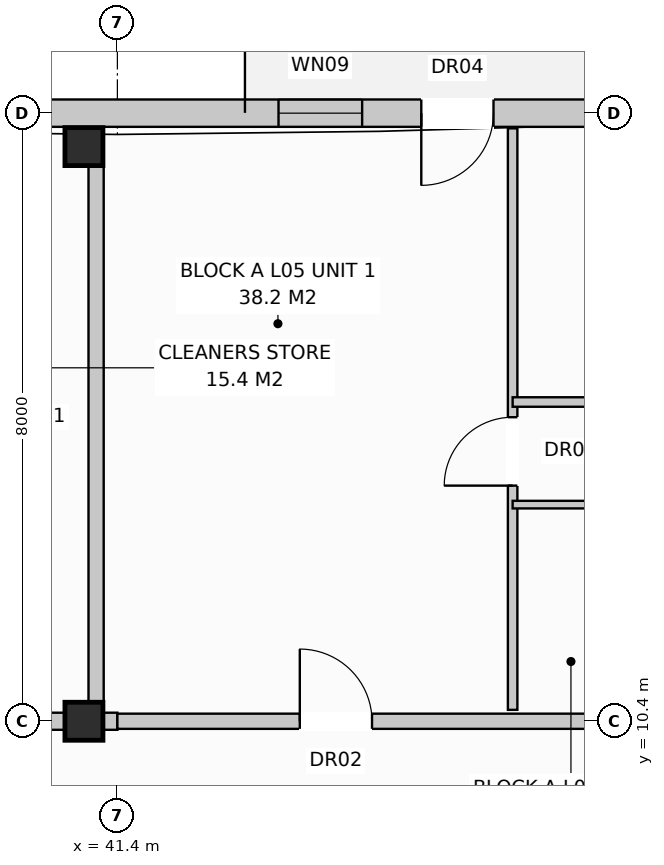
"""IFC4 building model, lengths in metres.
Left out: names, types, materials, properties, quantities, classifications, styles, units other than length and angle.
Written with IfcOpenShell. Run it as: python <this file> out.ifc"""

import sys

from ifc_helpers import new_model, si_unit, direction, frame, frame_2d, origin, origin_with_axes, origin_2d, place, context, subcontext, project, spatial, rectangle, extrude, element, fill, save


model = new_model("IFC4")
c1 = context("Model", 3, precision=1e-05, world=origin(), true_north=direction((0.0, 1.0)))
c2 = subcontext(c1, "Body", "Model", "MODEL_VIEW")
j1 = project(units=[si_unit("LENGTHUNIT", "METRE"), si_unit("PLANEANGLEUNIT", "RADIAN")], contexts=[c1])
p1 = place(None, origin())
s1 = spatial("IfcSite", under=j1, at=p1, CompositionType="ELEMENT")
p2 = place(p1, origin())
s2 = spatial("IfcBuilding", under=s1, at=p2, CompositionType="ELEMENT")
p3 = place(p2, frame((0.0, 0.0, 17.6)))
s3 = spatial("IfcBuildingStorey", under=s2, at=p3, CompositionType="ELEMENT", Elevation=17.6)
for number, where, z_axis, x_axis in (
    (1, (40.96, 10.4, 0.0), (0.0, 0.0, 1.0), (1.0, 0.0, 0.0)),
    (2, (40.96, 17.96, 0.0), (0.0, 0.0, 1.0), (1.0, 0.0, 0.0)),
):
    element("IfcColumn", number, at=place(p3, frame(where, z_axis=z_axis, x_axis=x_axis)), inside=s3, PredefinedType="COLUMN", context=c2, shape_type="SweptSolid", body=[
        extrude(rectangle(XDim=0.5, YDim=0.5, at=origin_2d()), origin(), (0.0, 0.0, 1.0), 3.2),
    ])
p4 = place(p3, frame((31.35, 18.4, 0.0), z_axis=(0.0, 0.0, 1.0), x_axis=(1.0, 0.0, 0.0)))
e3 = element("IfcWall", 3, at=p4, inside=s3, PredefinedType="STANDARD", context=c2, shape_type="SweptSolid", body=[
    extrude(rectangle(XDim=23.68, YDim=0.36, at=frame_2d((11.84, 0.0))), origin(), (0.0, 0.0, 1.0), 2.95),
])
p5 = place(p4, frame((14.048, 0.0, 0.0)))
e4 = element("IfcOpeningElement", 4, at=p5, cuts=e3, PredefinedType="OPENING", context=c2, shape_type="SweptSolid", body=[
    extrude(rectangle(XDim=0.95, YDim=2.1, at=frame_2d((0.475, 1.05))), frame((0.0, 0.192, 0.0), z_axis=(0.0, -1.0, 0.0), x_axis=(1.0, 0.0, 0.0)), (0.0, 0.0, 1.0), 0.384),
])
p6 = place(p4, frame((12.17, 0.0, 0.72)))
e5 = element("IfcOpeningElement", 5, at=p6, cuts=e3, PredefinedType="OPENING", context=c2, shape_type="SweptSolid", body=[
    extrude(rectangle(XDim=1.1, YDim=1.5, at=frame_2d((0.55, 0.75))), frame((0.0, 0.192, 0.0), z_axis=(0.0, -1.0, 0.0), x_axis=(1.0, 0.0, 0.0)), (0.0, 0.0, 1.0), 0.384),
])
p7 = place(p4, frame((17.403, 0.0, 0.8)))
e6 = element("IfcOpeningElement", 6, at=p7, cuts=e3, PredefinedType="OPENING", context=c2, shape_type="SweptSolid", body=[
    extrude(rectangle(XDim=1.95, YDim=1.65, at=frame_2d((0.975, 0.825))), frame((0.0, 0.192, 0.0), z_axis=(0.0, -1.0, 0.0), x_axis=(1.0, 0.0, 0.0)), (0.0, 0.0, 1.0), 0.384),
])
p8 = place(p4, frame((21.07, 0.0, 0.72)))
e7 = element("IfcOpeningElement", 7, at=p8, cuts=e3, PredefinedType="OPENING", context=c2, shape_type="SweptSolid", body=[
    extrude(rectangle(XDim=1.1, YDim=1.5, at=frame_2d((0.55, 0.75))), frame((0.0, 0.192, 0.0), z_axis=(0.0, -1.0, 0.0), x_axis=(1.0, 0.0, 0.0)), (0.0, 0.0, 1.0), 0.384),
])
p9 = place(p3, frame((41.12, 10.6, 0.0), z_axis=(0.0, 0.0, 1.0), x_axis=(0.0, 1.0, 0.0)))
e8 = element("IfcWall", 8, at=p9, inside=s3, PredefinedType="PARTITIONING", context=c2, shape_type="SweptSolid", body=[
    extrude(rectangle(XDim=7.6, YDim=0.2, at=frame_2d((3.8, 0.0))), origin(), (0.0, 0.0, 1.0), 2.95),
])
p10 = place(p3, frame((31.5, 10.4, 0.0), z_axis=(0.0, 0.0, 1.0), x_axis=(1.0, 0.0, 0.0)))
e9 = element("IfcWall", 9, at=p10, inside=s3, PredefinedType="PARTITIONING", context=c2, shape_type="SweptSolid", body=[
    extrude(rectangle(XDim=9.9, YDim=0.225, at=frame_2d((4.95, 0.0))), origin(), (0.0, 0.0, 1.0), 2.39),
])
p11 = place(p10, frame((0.475, 0.0, 0.0)))
e10 = element("IfcOpeningElement", 10, at=p11, cuts=e9, PredefinedType="OPENING", context=c2, shape_type="SweptSolid", body=[
    extrude(rectangle(XDim=1.1, YDim=2.15, at=frame_2d((0.55, 1.075))), frame((0.0, 0.125, 0.0), z_axis=(0.0, -1.0, 0.0), x_axis=(1.0, 0.0, 0.0)), (0.0, 0.0, 1.0), 0.249),
])
p12 = place(p10, frame((5.75, 0.0, 0.0)))
e11 = element("IfcOpeningElement", 11, at=p12, cuts=e9, PredefinedType="OPENING", context=c2, shape_type="SweptSolid", body=[
    extrude(rectangle(XDim=0.9, YDim=2.1, at=frame_2d((0.45, 1.05))), frame((0.0, 0.125, 0.0), z_axis=(0.0, -1.0, 0.0), x_axis=(1.0, 0.0, 0.0)), (0.0, 0.0, 1.0), 0.249),
])
p13 = place(p10, frame((7.8, 0.0, 0.0)))
e12 = element("IfcOpeningElement", 12, at=p13, cuts=e9, PredefinedType="OPENING", context=c2, shape_type="SweptSolid", body=[
    extrude(rectangle(XDim=0.95, YDim=2.15, at=frame_2d((0.475, 1.075))), frame((0.0, 0.125, 0.0), z_axis=(0.0, -1.0, 0.0), x_axis=(1.0, 0.0, 0.0)), (0.0, 0.0, 1.0), 0.249),
])
p14 = place(p3, frame((41.4, 10.4, 0.0), z_axis=(0.0, 0.0, 1.0), x_axis=(1.0, 0.0, 0.0)))
e13 = element("IfcWall", 13, at=p14, inside=s3, PredefinedType="PARTITIONING", context=c2, shape_type="SweptSolid", body=[
    extrude(rectangle(XDim=13.8, YDim=0.2, at=frame_2d((6.9, 0.0))), origin(), (0.0, 0.0, 1.0), 2.39),
])
p15 = place(p14, frame((2.4, 0.0, 0.0)))
e14 = element("IfcOpeningElement", 14, at=p15, cuts=e13, PredefinedType="OPENING", context=c2, shape_type="SweptSolid", body=[
    extrude(rectangle(XDim=0.95, YDim=2.15, at=frame_2d((0.475, 1.075))), frame((0.0, 0.112, 0.0), z_axis=(0.0, -1.0, 0.0), x_axis=(1.0, 0.0, 0.0)), (0.0, 0.0, 1.0), 0.224),
])
p16 = place(p3, frame((46.6, 10.55, 0.0), z_axis=(0.0, 0.0, 1.0), x_axis=(0.0, 1.0, 0.0)))
e15 = element("IfcWall", 15, at=p16, inside=s3, PredefinedType="PARTITIONING", context=c2, shape_type="SweptSolid", body=[
    extrude(rectangle(XDim=7.65, YDim=0.125, at=frame_2d((3.825, 0.0))), origin(), (0.0, 0.0, 1.0), 2.95),
])
p17 = place(p16, frame((2.95, 0.0, 0.0)))
e16 = element("IfcOpeningElement", 16, at=p17, cuts=e15, PredefinedType="OPENING", context=c2, shape_type="SweptSolid", body=[
    extrude(rectangle(XDim=0.9, YDim=2.1, at=frame_2d((0.45, 1.05))), frame((0.0, 0.074, 0.0), z_axis=(0.0, -1.0, 0.0), x_axis=(1.0, 0.0, 0.0)), (0.0, 0.0, 1.0), 0.149),
])
p18 = place(p3, frame((46.6, 13.25, 0.0), z_axis=(0.0, 0.0, 1.0), x_axis=(1.0, 0.0, 0.0)))
e17 = element("IfcWall", 17, at=p18, inside=s3, PredefinedType="PARTITIONING", context=c2, shape_type="SweptSolid", body=[
    extrude(rectangle(XDim=8.5, YDim=0.1, at=frame_2d((4.25, 0.0))), origin(), (0.0, 0.0, 1.0), 2.95),
])
p19 = place(p18, frame((1.0, 0.0, 0.0)))
e18 = element("IfcOpeningElement", 18, at=p19, cuts=e17, PredefinedType="OPENING", context=c2, shape_type="SweptSolid", body=[
    extrude(rectangle(XDim=0.85, YDim=2.1, at=frame_2d((0.425, 1.05))), frame((0.0, 0.062, 0.0), z_axis=(0.0, -1.0, 0.0), x_axis=(1.0, 0.0, 0.0)), (0.0, 0.0, 1.0), 0.124),
])
p20 = place(p18, frame((3.4, 0.0, 0.0)))
e19 = element("IfcOpeningElement", 19, at=p20, cuts=e17, PredefinedType="OPENING", context=c2, shape_type="SweptSolid", body=[
    extrude(rectangle(XDim=0.85, YDim=2.05, at=frame_2d((0.425, 1.025))), frame((0.0, 0.062, 0.0), z_axis=(0.0, -1.0, 0.0), x_axis=(1.0, 0.0, 0.0)), (0.0, 0.0, 1.0), 0.124),
])
p21 = place(p18, frame((6.2, 0.0, 0.0)))
e20 = element("IfcOpeningElement", 20, at=p21, cuts=e17, PredefinedType="OPENING", context=c2, shape_type="SweptSolid", body=[
    extrude(rectangle(XDim=0.85, YDim=2.05, at=frame_2d((0.425, 1.025))), frame((0.0, 0.062, 0.0), z_axis=(0.0, -1.0, 0.0), x_axis=(1.0, 0.0, 0.0)), (0.0, 0.0, 1.0), 0.124),
])
p22 = place(p3, frame((46.6, 14.6, 0.0), z_axis=(0.0, 0.0, 1.0), x_axis=(1.0, 0.0, 0.0)))
e21 = element("IfcWall", 21, at=p22, inside=s3, PredefinedType="PARTITIONING", context=c2, shape_type="SweptSolid", body=[
    extrude(rectangle(XDim=8.5, YDim=0.125, at=frame_2d((4.25, 0.0))), origin(), (0.0, 0.0, 1.0), 2.95),
])
p23 = place(p22, frame((1.5, 0.0, 0.0)))
e22 = element("IfcOpeningElement", 22, at=p23, cuts=e21, PredefinedType="OPENING", context=c2, shape_type="SweptSolid", body=[
    extrude(rectangle(XDim=0.9, YDim=2.1, at=frame_2d((0.45, 1.05))), frame((0.0, 0.074, 0.0), z_axis=(0.0, -1.0, 0.0), x_axis=(1.0, 0.0, 0.0)), (0.0, 0.0, 1.0), 0.149),
])
p24 = place(p22, frame((5.6, 0.0, 0.0)))
e23 = element("IfcOpeningElement", 23, at=p24, cuts=e21, PredefinedType="OPENING", context=c2, shape_type="SweptSolid", body=[
    extrude(rectangle(XDim=0.9, YDim=2.1, at=frame_2d((0.45, 1.05))), frame((0.0, 0.074, 0.0), z_axis=(0.0, -1.0, 0.0), x_axis=(1.0, 0.0, 0.0)), (0.0, 0.0, 1.0), 0.149),
])
p25 = place(p5, frame((0.95, 0.0, 0.0), z_axis=(0.0, 0.0, 1.0), x_axis=(-1.0, 0.0, 0.0)))
e24 = element("IfcDoor", 24, at=p25, inside=s3, OperationType="SINGLE_SWING_LEFT", PredefinedType="DOOR", context=c2, shape_type="SweptSolid", body=[
    extrude(rectangle(XDim=0.95, YDim=2.1, at=frame_2d((0.475, 1.05))), frame((0.0, 0.025, 0.0), z_axis=(0.0, -1.0, 0.0), x_axis=(1.0, 0.0, 0.0)), (0.0, 0.0, 1.0), 0.05),
])
fill(e4, e24)
p26 = place(p6, origin_with_axes())
e25 = element("IfcWindow", 25, at=p26, inside=s3, PartitioningType="SINGLE_PANEL", PredefinedType="WINDOW", context=c2, shape_type="SweptSolid", body=[
    extrude(rectangle(XDim=1.1, YDim=1.5, at=frame_2d((0.55, 0.75))), frame((0.0, 0.03, 0.0), z_axis=(0.0, -1.0, 0.0), x_axis=(1.0, 0.0, 0.0)), (0.0, 0.0, 1.0), 0.06),
])
fill(e5, e25)
p27 = place(p15, origin_with_axes())
e26 = element("IfcDoor", 26, at=p27, inside=s3, OperationType="SINGLE_SWING_LEFT", PredefinedType="DOOR", context=c2, shape_type="SweptSolid", body=[
    extrude(rectangle(XDim=0.95, YDim=2.15, at=frame_2d((0.475, 1.075))), frame((0.0, 0.025, 0.0), z_axis=(0.0, -1.0, 0.0), x_axis=(1.0, 0.0, 0.0)), (0.0, 0.0, 1.0), 0.05),
])
fill(e14, e26)
p28 = place(p17, origin_with_axes())
e27 = element("IfcDoor", 27, at=p28, inside=s3, OperationType="SINGLE_SWING_LEFT", PredefinedType="DOOR", context=c2, shape_type="SweptSolid", body=[
    extrude(rectangle(XDim=0.9, YDim=2.1, at=frame_2d((0.45, 1.05))), frame((0.0, 0.025, 0.0), z_axis=(0.0, -1.0, 0.0), x_axis=(1.0, 0.0, 0.0)), (0.0, 0.0, 1.0), 0.05),
])
fill(e16, e27)
save(model, sys.argv[1])
